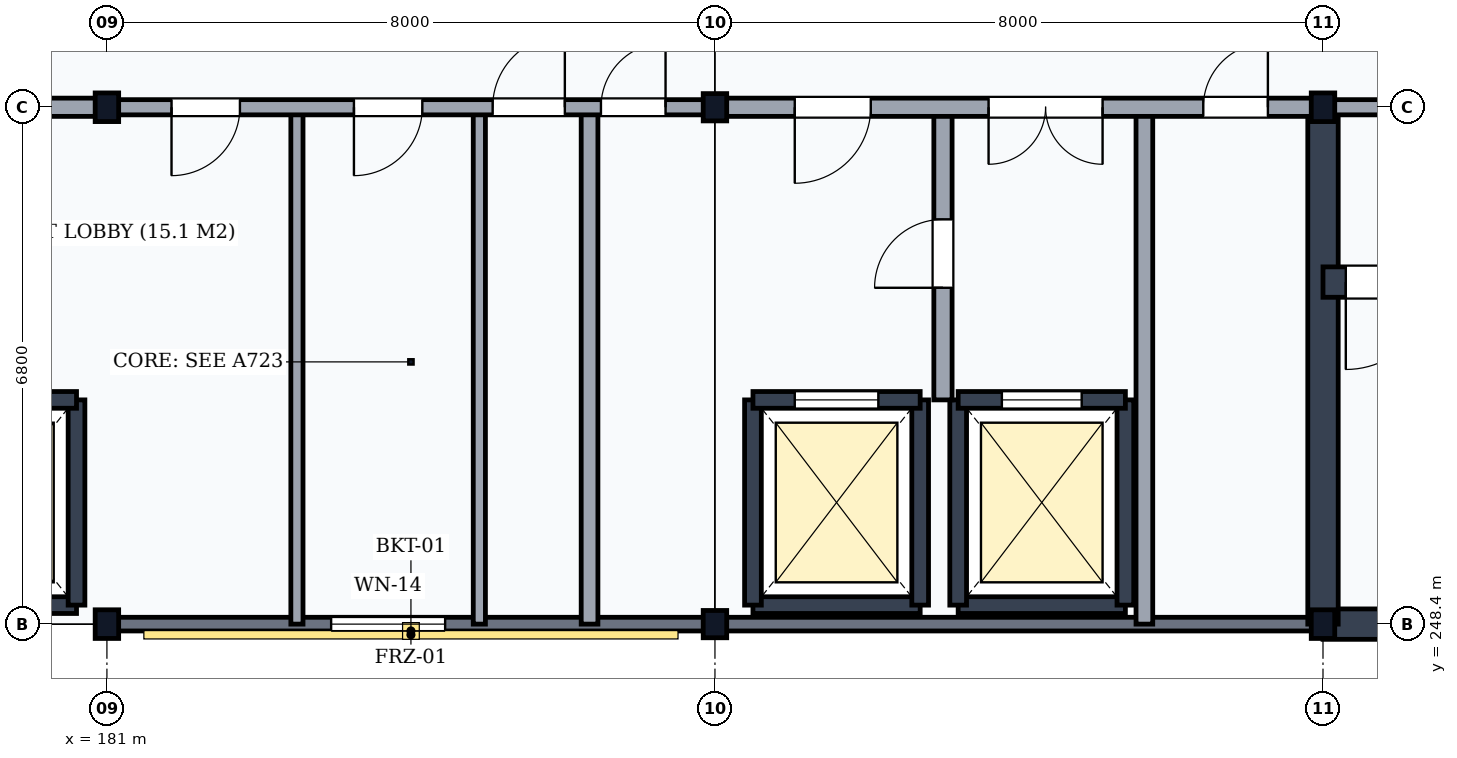
"""IFC4 building model, lengths in metres.
Left out: names, types, materials, properties, quantities, classifications, styles, units other than length and angle.
Written with IfcOpenShell. Run it as: python <this file> out.ifc"""

import sys

from ifc_helpers import new_model, si_unit, direction, frame, frame_2d, origin, origin_2d, place, context, subcontext, project, spatial, rectangle, i_section, extrude, element, fill, save


model = new_model("IFC4")
c1 = context("Model", 3, precision=1e-05, world=origin(), true_north=direction((0.0, 1.0)))
c2 = subcontext(c1, "Body", "Model", "MODEL_VIEW")
j1 = project(units=[si_unit("LENGTHUNIT", "METRE"), si_unit("PLANEANGLEUNIT", "RADIAN")], contexts=[c1])
p1 = place(None, origin())
s1 = spatial("IfcSite", under=j1, at=p1, CompositionType="ELEMENT")
p2 = place(p1, origin())
s2 = spatial("IfcBuilding", under=s1, at=p2, CompositionType="ELEMENT")
p3 = place(p2, frame((0.0, 0.0, 51.6)))
s3 = spatial("IfcBuildingStorey", under=s2, at=p3, CompositionType="ELEMENT", Elevation=51.6)
for number, where, z_axis, x_axis in (
    (1, (181.0, 248.4, 0.0), (0.0, 0.0, 1.0), (1.0, 0.0, 0.0)),
    (2, (181.0, 255.2, 0.0), (0.0, 0.0, 1.0), (1.0, 0.0, 0.0)),
):
    element("IfcColumn", number, at=place(p3, frame(where, z_axis=z_axis, x_axis=x_axis)), inside=s3, PredefinedType="COLUMN", context=c2, shape_type="SweptSolid", body=[
        extrude(i_section(OverallWidth=0.309, OverallDepth=0.377, WebThickness=0.021, FlangeThickness=0.04, FilletRadius=0.027, at=origin_2d()), origin(), (0.0, 0.0, 1.0), 4.5),
    ])
for number, where, z_axis, x_axis in (
    (3, (189.0, 248.4, 0.0), (0.0, 0.0, 1.0), (1.0, 0.0, 0.0)),
    (4, (189.0, 255.2, 0.0), (0.0, 0.0, 1.0), (1.0, 0.0, 0.0)),
):
    element("IfcColumn", number, at=place(p3, frame(where, z_axis=z_axis, x_axis=x_axis)), inside=s3, PredefinedType="COLUMN", context=c2, shape_type="SweptSolid", body=[
        extrude(i_section(OverallWidth=0.309, OverallDepth=0.359, WebThickness=0.021, FlangeThickness=0.04, FilletRadius=0.027, at=origin_2d()), origin(), (0.0, 0.0, 1.0), 4.5),
    ])
for number, where, z_axis, x_axis in (
    (5, (197.0, 248.4, 0.0), (0.0, 0.0, 1.0), (1.0, 0.0, 0.0)),
    (6, (197.0, 255.2, 0.0), (0.0, 0.0, 1.0), (1.0, 0.0, 0.0)),
):
    element("IfcColumn", number, at=place(p3, frame(where, z_axis=z_axis, x_axis=x_axis)), inside=s3, PredefinedType="COLUMN", context=c2, shape_type="SweptSolid", body=[
        extrude(i_section(OverallWidth=0.309, OverallDepth=0.377, WebThickness=0.021, FlangeThickness=0.04, FilletRadius=0.027, at=origin_2d()), origin(), (0.0, 0.0, 1.0), 4.5),
    ])
p4 = place(p3, frame((181.006, 248.4, 0.0), z_axis=(0.0, 0.0, 1.0), x_axis=(1.0, 0.0, 0.0)))
e7 = element("IfcWall", 7, at=p4, inside=s3, PredefinedType="SOLIDWALL", context=c2, shape_type="SweptSolid", body=[
    extrude(rectangle(XDim=7.988, YDim=0.18, at=frame_2d((3.994, 0.0))), origin(), (0.0, 0.0, 1.0), 3.868),
])
p5 = place(p4, frame((2.944, 0.0, 0.95)))
e8 = element("IfcOpeningElement", 8, at=p5, cuts=e7, PredefinedType="OPENING", context=c2, shape_type="SweptSolid", body=[
    extrude(rectangle(XDim=1.5, YDim=1.9, at=frame_2d((0.75, 0.95))), frame((0.0, 0.105, 0.0), z_axis=(0.0, -1.0, 0.0), x_axis=(1.0, 0.0, 0.0)), (0.0, 0.0, 1.0), 0.21),
])
p6 = place(p3, frame((189.006, 248.4, 0.0), z_axis=(0.0, 0.0, 1.0), x_axis=(1.0, 0.0, 0.0)))
e9 = element("IfcWall", 9, at=p6, inside=s3, PredefinedType="SOLIDWALL", context=c2, shape_type="SweptSolid", body=[
    extrude(rectangle(XDim=7.988, YDim=0.18, at=frame_2d((3.994, 0.0))), origin(), (0.0, 0.0, 1.0), 3.868),
])
p7 = place(p3, frame((197.0, 248.4, 0.0), z_axis=(0.0, 0.0, 1.0), x_axis=(1.0, 0.0, 0.0)))
e10 = element("IfcWall", 10, at=p7, inside=s3, PredefinedType="SHEAR", context=c2, shape_type="SweptSolid", body=[
    extrude(rectangle(XDim=8.0, YDim=0.4, at=frame_2d((4.0, 0.0))), origin(), (0.0, 0.0, 1.0), 4.18),
])
p8 = place(p3, frame((197.0, 248.4, 0.0), z_axis=(0.0, 0.0, 1.0), x_axis=(0.0, 1.0, 0.0)))
e11 = element("IfcWall", 11, at=p8, inside=s3, PredefinedType="SHEAR", context=c2, shape_type="SweptSolid", body=[
    extrude(rectangle(XDim=6.8, YDim=0.4, at=frame_2d((3.4, 0.0))), origin(), (0.0, 0.0, 1.0), 4.18),
])
p9 = place(p3, frame((197.0, 252.9, 0.0), z_axis=(0.0, 0.0, 1.0), x_axis=(1.0, 0.0, 0.0)))
e12 = element("IfcWall", 12, at=p9, inside=s3, PredefinedType="SHEAR", context=c2, shape_type="SweptSolid", body=[
    extrude(rectangle(XDim=8.0, YDim=0.4, at=frame_2d((4.0, 0.0))), origin(), (0.0, 0.0, 1.0), 4.18),
])
p10 = place(p9, frame((0.3, 0.0, 0.0)))
e13 = element("IfcOpeningElement", 13, at=p10, cuts=e12, PredefinedType="OPENING", context=c2, shape_type="SweptSolid", body=[
    extrude(rectangle(XDim=1.15, YDim=2.15, at=frame_2d((0.575, 1.075))), frame((0.0, 0.215, 0.0), z_axis=(0.0, -1.0, 0.0), x_axis=(1.0, 0.0, 0.0)), (0.0, 0.0, 1.0), 0.43),
])
p11 = place(p3, frame((197.0, 255.2, 0.0), z_axis=(0.0, 0.0, 1.0), x_axis=(1.0, 0.0, 0.0)))
e14 = element("IfcWall", 14, at=p11, inside=s3, PredefinedType="PARTITIONING", context=c2, shape_type="SweptSolid", body=[
    extrude(rectangle(XDim=8.0, YDim=0.2, at=frame_2d((4.0, 0.0))), origin(), (0.0, 0.0, 1.0), 3.678),
])
p12 = place(p11, frame((3.275, 0.0, 0.0)))
e15 = element("IfcOpeningElement", 15, at=p12, cuts=e14, PredefinedType="OPENING", context=c2, shape_type="SweptSolid", body=[
    extrude(rectangle(XDim=1.45, YDim=2.2, at=frame_2d((0.725, 1.1))), frame((0.0, 0.115, 0.0), z_axis=(0.0, -1.0, 0.0), x_axis=(1.0, 0.0, 0.0)), (0.0, 0.0, 1.0), 0.23),
])
p13 = place(p3, frame((178.4, 248.65, 0.0), z_axis=(0.0, 0.0, 1.0), x_axis=(1.0, 0.0, 0.0)))
e16 = element("IfcWall", 16, at=p13, inside=s3, PredefinedType="SHEAR", context=c2, shape_type="SweptSolid", body=[
    extrude(rectangle(XDim=2.2, YDim=0.22, at=frame_2d((1.1, 0.0))), origin(), (0.0, 0.0, 1.0), 4.18),
])
p14 = place(p3, frame((180.6, 248.65, 0.0), z_axis=(0.0, 0.0, 1.0), x_axis=(0.0, 1.0, 0.0)))
e17 = element("IfcWall", 17, at=p14, inside=s3, PredefinedType="SHEAR", context=c2, shape_type="SweptSolid", body=[
    extrude(rectangle(XDim=2.7, YDim=0.22, at=frame_2d((1.35, 0.0))), origin(), (0.0, 0.0, 1.0), 4.18),
])
p15 = place(p3, frame((178.4, 251.35, 0.0), z_axis=(0.0, 0.0, 1.0), x_axis=(1.0, 0.0, 0.0)))
e18 = element("IfcWall", 18, at=p15, inside=s3, PredefinedType="SHEAR", context=c2, shape_type="SweptSolid", body=[
    extrude(rectangle(XDim=2.2, YDim=0.22, at=frame_2d((1.1, 0.0))), origin(), (0.0, 0.0, 1.0), 4.18),
])
p16 = place(p15, frame((0.575, 0.0, 0.0)))
e19 = element("IfcOpeningElement", 19, at=p16, cuts=e18, PredefinedType="OPENING", context=c2, shape_type="SweptSolid", body=[
    extrude(rectangle(XDim=1.05, YDim=2.15, at=frame_2d((0.525, 1.075))), frame((0.0, 0.125, 0.0), z_axis=(0.0, -1.0, 0.0), x_axis=(1.0, 0.0, 0.0)), (0.0, 0.0, 1.0), 0.25),
])
p17 = place(p3, frame((189.5, 248.65, 0.0), z_axis=(0.0, 0.0, 1.0), x_axis=(1.0, 0.0, 0.0)))
e20 = element("IfcWall", 20, at=p17, inside=s3, PredefinedType="SHEAR", context=c2, shape_type="SweptSolid", body=[
    extrude(rectangle(XDim=2.2, YDim=0.22, at=frame_2d((1.1, 0.0))), origin(), (0.0, 0.0, 1.0), 4.18),
])
for number, where, z_axis, x_axis in (
    (21, (189.5, 248.65, 0.0), (0.0, 0.0, 1.0), (0.0, 1.0, 0.0)),
    (22, (191.7, 248.65, 0.0), (0.0, 0.0, 1.0), (0.0, 1.0, 0.0)),
):
    element("IfcWall", number, at=place(p3, frame(where, z_axis=z_axis, x_axis=x_axis)), inside=s3, PredefinedType="SHEAR", context=c2, shape_type="SweptSolid", body=[
        extrude(rectangle(XDim=2.7, YDim=0.22, at=frame_2d((1.35, 0.0))), origin(), (0.0, 0.0, 1.0), 4.18),
    ])
p18 = place(p3, frame((189.5, 251.35, 0.0), z_axis=(0.0, 0.0, 1.0), x_axis=(1.0, 0.0, 0.0)))
e23 = element("IfcWall", 23, at=p18, inside=s3, PredefinedType="SHEAR", context=c2, shape_type="SweptSolid", body=[
    extrude(rectangle(XDim=2.2, YDim=0.22, at=frame_2d((1.1, 0.0))), origin(), (0.0, 0.0, 1.0), 4.18),
])
p19 = place(p18, frame((0.55, 0.0, 0.0)))
e24 = element("IfcOpeningElement", 24, at=p19, cuts=e23, PredefinedType="OPENING", context=c2, shape_type="SweptSolid", body=[
    extrude(rectangle(XDim=1.1, YDim=2.15, at=frame_2d((0.55, 1.075))), frame((0.0, 0.125, 0.0), z_axis=(0.0, -1.0, 0.0), x_axis=(1.0, 0.0, 0.0)), (0.0, 0.0, 1.0), 0.25),
])
p20 = place(p3, frame((192.2, 248.65, 0.0), z_axis=(0.0, 0.0, 1.0), x_axis=(1.0, 0.0, 0.0)))
e25 = element("IfcWall", 25, at=p20, inside=s3, PredefinedType="SHEAR", context=c2, shape_type="SweptSolid", body=[
    extrude(rectangle(XDim=2.2, YDim=0.22, at=frame_2d((1.1, 0.0))), origin(), (0.0, 0.0, 1.0), 4.18),
])
for number, where, z_axis, x_axis in (
    (26, (192.2, 248.65, 0.0), (0.0, 0.0, 1.0), (0.0, 1.0, 0.0)),
    (27, (194.4, 248.65, 0.0), (0.0, 0.0, 1.0), (0.0, 1.0, 0.0)),
):
    element("IfcWall", number, at=place(p3, frame(where, z_axis=z_axis, x_axis=x_axis)), inside=s3, PredefinedType="SHEAR", context=c2, shape_type="SweptSolid", body=[
        extrude(rectangle(XDim=2.7, YDim=0.22, at=frame_2d((1.35, 0.0))), origin(), (0.0, 0.0, 1.0), 4.18),
    ])
p21 = place(p3, frame((192.2, 251.35, 0.0), z_axis=(0.0, 0.0, 1.0), x_axis=(1.0, 0.0, 0.0)))
e28 = element("IfcWall", 28, at=p21, inside=s3, PredefinedType="SHEAR", context=c2, shape_type="SweptSolid", body=[
    extrude(rectangle(XDim=2.2, YDim=0.22, at=frame_2d((1.1, 0.0))), origin(), (0.0, 0.0, 1.0), 4.18),
])
p22 = place(p21, frame((0.575, 0.0, 0.0)))
e29 = element("IfcOpeningElement", 29, at=p22, cuts=e28, PredefinedType="OPENING", context=c2, shape_type="SweptSolid", body=[
    extrude(rectangle(XDim=1.05, YDim=2.15, at=frame_2d((0.525, 1.075))), frame((0.0, 0.125, 0.0), z_axis=(0.0, -1.0, 0.0), x_axis=(1.0, 0.0, 0.0)), (0.0, 0.0, 1.0), 0.25),
])
p23 = place(p3, frame((192.0, 251.35, 0.0), z_axis=(0.0, 0.0, 1.0), x_axis=(0.0, 1.0, 0.0)))
e30 = element("IfcWall", 30, at=p23, inside=s3, PredefinedType="PARTITIONING", context=c2, shape_type="SweptSolid", body=[
    extrude(rectangle(XDim=3.85, YDim=0.24, at=frame_2d((1.925, 0.0))), origin(), (0.0, 0.0, 1.0), 4.18),
])
p24 = place(p23, frame((1.475, 0.0, 0.0)))
e31 = element("IfcOpeningElement", 31, at=p24, cuts=e30, PredefinedType="OPENING", context=c2, shape_type="SweptSolid", body=[
    extrude(rectangle(XDim=0.9, YDim=2.1, at=frame_2d((0.45, 1.05))), frame((0.0, 0.135, 0.0), z_axis=(0.0, -1.0, 0.0), x_axis=(1.0, 0.0, 0.0)), (0.0, 0.0, 1.0), 0.27),
])
p25 = place(p3, frame((194.65, 248.4, 0.0), z_axis=(0.0, 0.0, 1.0), x_axis=(0.0, 1.0, 0.0)))
e32 = element("IfcWall", 32, at=p25, inside=s3, PredefinedType="PARTITIONING", context=c2, shape_type="SweptSolid", body=[
    extrude(rectangle(XDim=6.8, YDim=0.22, at=frame_2d((3.4, 0.0))), origin(), (0.0, 0.0, 1.0), 4.18),
])
for number, where, z_axis, x_axis in (
    (33, (183.5, 248.4, 0.0), (0.0, 0.0, 1.0), (0.0, 1.0, 0.0)),
    (34, (185.9, 248.4, 0.0), (0.0, 0.0, 1.0), (0.0, 1.0, 0.0)),
):
    element("IfcWall", number, at=place(p3, frame(where, z_axis=z_axis, x_axis=x_axis)), inside=s3, PredefinedType="PARTITIONING", context=c2, shape_type="SweptSolid", body=[
        extrude(rectangle(XDim=6.8, YDim=0.16, at=frame_2d((3.4, 0.0))), origin(), (0.0, 0.0, 1.0), 4.18),
    ])
p26 = place(p3, frame((187.35, 248.4, 0.0), z_axis=(0.0, 0.0, 1.0), x_axis=(0.0, 1.0, 0.0)))
e35 = element("IfcWall", 35, at=p26, inside=s3, PredefinedType="PARTITIONING", context=c2, shape_type="SweptSolid", body=[
    extrude(rectangle(XDim=6.8, YDim=0.22, at=frame_2d((3.4, 0.0))), origin(), (0.0, 0.0, 1.0), 4.18),
])
p27 = place(p3, frame((173.0, 255.2, 0.0), z_axis=(0.0, 0.0, 1.0), x_axis=(1.0, 0.0, 0.0)))
e36 = element("IfcWall", 36, at=p27, inside=s3, PredefinedType="PARTITIONING", context=c2, shape_type="SweptSolid", body=[
    extrude(rectangle(XDim=8.0, YDim=0.24, at=frame_2d((4.0, 0.0))), origin(), (0.0, 0.0, 1.0), 3.678),
])
p28 = place(p27, frame((1.05, 0.0, 0.0)))
e37 = element("IfcOpeningElement", 37, at=p28, cuts=e36, PredefinedType="OPENING", context=c2, shape_type="SweptSolid", body=[
    extrude(rectangle(XDim=1.0, YDim=2.1, at=frame_2d((0.5, 1.05))), frame((0.0, 0.135, 0.0), z_axis=(0.0, -1.0, 0.0), x_axis=(1.0, 0.0, 0.0)), (0.0, 0.0, 1.0), 0.27),
])
p29 = place(p27, frame((4.6, 0.0, 0.0)))
e38 = element("IfcOpeningElement", 38, at=p29, cuts=e36, PredefinedType="OPENING", context=c2, shape_type="SweptSolid", body=[
    extrude(rectangle(XDim=1.6, YDim=2.25, at=frame_2d((0.8, 1.125))), frame((0.0, 0.135, 0.0), z_axis=(0.0, -1.0, 0.0), x_axis=(1.0, 0.0, 0.0)), (0.0, 0.0, 1.0), 0.27),
])
p30 = place(p3, frame((181.0, 255.2, 0.0), z_axis=(0.0, 0.0, 1.0), x_axis=(1.0, 0.0, 0.0)))
e39 = element("IfcWall", 39, at=p30, inside=s3, PredefinedType="PARTITIONING", context=c2, shape_type="SweptSolid", body=[
    extrude(rectangle(XDim=8.0, YDim=0.2, at=frame_2d((4.0, 0.0))), origin(), (0.0, 0.0, 1.0), 3.678),
])
p31 = place(p30, frame((0.85, 0.0, 0.0)))
e40 = element("IfcOpeningElement", 40, at=p31, cuts=e39, PredefinedType="OPENING", context=c2, shape_type="SweptSolid", body=[
    extrude(rectangle(XDim=0.9, YDim=2.1, at=frame_2d((0.45, 1.05))), frame((0.0, 0.115, 0.0), z_axis=(0.0, -1.0, 0.0), x_axis=(1.0, 0.0, 0.0)), (0.0, 0.0, 1.0), 0.23),
])
p32 = place(p30, frame((3.25, 0.0, 0.0)))
e41 = element("IfcOpeningElement", 41, at=p32, cuts=e39, PredefinedType="OPENING", context=c2, shape_type="SweptSolid", body=[
    extrude(rectangle(XDim=0.9, YDim=2.1, at=frame_2d((0.45, 1.05))), frame((0.0, 0.115, 0.0), z_axis=(0.0, -1.0, 0.0), x_axis=(1.0, 0.0, 0.0)), (0.0, 0.0, 1.0), 0.23),
])
p33 = place(p30, frame((5.075, 0.0, 0.0)))
e42 = element("IfcOpeningElement", 42, at=p33, cuts=e39, PredefinedType="OPENING", context=c2, shape_type="SweptSolid", body=[
    extrude(rectangle(XDim=0.95, YDim=2.1, at=frame_2d((0.475, 1.05))), frame((0.0, 0.115, 0.0), z_axis=(0.0, -1.0, 0.0), x_axis=(1.0, 0.0, 0.0)), (0.0, 0.0, 1.0), 0.23),
])
p34 = place(p30, frame((6.5, 0.0, 0.0)))
e43 = element("IfcOpeningElement", 43, at=p34, cuts=e39, PredefinedType="OPENING", context=c2, shape_type="SweptSolid", body=[
    extrude(rectangle(XDim=0.85, YDim=2.1, at=frame_2d((0.425, 1.05))), frame((0.0, 0.115, 0.0), z_axis=(0.0, -1.0, 0.0), x_axis=(1.0, 0.0, 0.0)), (0.0, 0.0, 1.0), 0.23),
])
p35 = place(p3, frame((189.0, 255.2, 0.0), z_axis=(0.0, 0.0, 1.0), x_axis=(1.0, 0.0, 0.0)))
e44 = element("IfcWall", 44, at=p35, inside=s3, PredefinedType="PARTITIONING", context=c2, shape_type="SweptSolid", body=[
    extrude(rectangle(XDim=8.0, YDim=0.24, at=frame_2d((4.0, 0.0))), origin(), (0.0, 0.0, 1.0), 3.678),
])
p36 = place(p35, frame((1.05, 0.0, 0.0)))
e45 = element("IfcOpeningElement", 45, at=p36, cuts=e44, PredefinedType="OPENING", context=c2, shape_type="SweptSolid", body=[
    extrude(rectangle(XDim=1.0, YDim=2.1, at=frame_2d((0.5, 1.05))), frame((0.0, 0.135, 0.0), z_axis=(0.0, -1.0, 0.0), x_axis=(1.0, 0.0, 0.0)), (0.0, 0.0, 1.0), 0.27),
])
p37 = place(p35, frame((3.6, 0.0, 0.0)))
e46 = element("IfcOpeningElement", 46, at=p37, cuts=e44, PredefinedType="OPENING", context=c2, shape_type="SweptSolid", body=[
    extrude(rectangle(XDim=1.5, YDim=2.25, at=frame_2d((0.75, 1.125))), frame((0.0, 0.135, 0.0), z_axis=(0.0, -1.0, 0.0), x_axis=(1.0, 0.0, 0.0)), (0.0, 0.0, 1.0), 0.27),
])
p38 = place(p35, frame((6.425, 0.0, 0.0)))
e47 = element("IfcOpeningElement", 47, at=p38, cuts=e44, PredefinedType="OPENING", context=c2, shape_type="SweptSolid", body=[
    extrude(rectangle(XDim=0.85, YDim=2.1, at=frame_2d((0.425, 1.05))), frame((0.0, 0.135, 0.0), z_axis=(0.0, -1.0, 0.0), x_axis=(1.0, 0.0, 0.0)), (0.0, 0.0, 1.0), 0.27),
])
p39 = place(p5, origin())
e48 = element("IfcWindow", 48, at=p39, inside=s3, PartitioningType="SINGLE_PANEL", PredefinedType="WINDOW", context=c2, shape_type="SweptSolid", body=[
    extrude(rectangle(XDim=1.5, YDim=1.9, at=frame_2d((0.75, 0.95))), frame((0.0, 0.03, 0.0), z_axis=(0.0, -1.0, 0.0), x_axis=(1.0, 0.0, 0.0)), (0.0, 0.0, 1.0), 0.06),
])
fill(e8, e48)
p40 = place(p10, frame((1.15, 0.0, 0.0), z_axis=(0.0, 0.0, 1.0), x_axis=(-1.0, 0.0, 0.0)))
e49 = element("IfcDoor", 49, at=p40, inside=s3, OperationType="SINGLE_SWING_RIGHT", PredefinedType="DOOR", context=c2, shape_type="SweptSolid", body=[
    extrude(rectangle(XDim=1.15, YDim=2.15, at=frame_2d((0.575, 1.075))), frame((0.0, 0.025, 0.0), z_axis=(0.0, -1.0, 0.0), x_axis=(1.0, 0.0, 0.0)), (0.0, 0.0, 1.0), 0.05),
])
fill(e13, e49)
p41 = place(p19, origin())
e50 = element("IfcDoor", 50, at=p41, inside=s3, OperationType="DOUBLE_DOOR_SLIDING", PredefinedType="USERDEFINED", context=c2, shape_type="SweptSolid", body=[
    extrude(rectangle(XDim=1.1, YDim=2.15, at=frame_2d((0.55, 1.075))), frame((0.0, 0.025, 0.0), z_axis=(0.0, -1.0, 0.0), x_axis=(1.0, 0.0, 0.0)), (0.0, 0.0, 1.0), 0.05),
])
fill(e24, e50)
p42 = place(p22, origin())
e51 = element("IfcDoor", 51, at=p42, inside=s3, OperationType="DOUBLE_DOOR_SLIDING", PredefinedType="USERDEFINED", context=c2, shape_type="SweptSolid", body=[
    extrude(rectangle(XDim=1.05, YDim=2.15, at=frame_2d((0.525, 1.075))), frame((0.0, 0.025, 0.0), z_axis=(0.0, -1.0, 0.0), x_axis=(1.0, 0.0, 0.0)), (0.0, 0.0, 1.0), 0.05),
])
fill(e29, e51)
p43 = place(p24, origin())
e52 = element("IfcDoor", 52, at=p43, inside=s3, OperationType="SINGLE_SWING_LEFT", PredefinedType="DOOR", context=c2, shape_type="SweptSolid", body=[
    extrude(rectangle(XDim=0.9, YDim=2.1, at=frame_2d((0.45, 1.05))), frame((0.0, 0.025, 0.0), z_axis=(0.0, -1.0, 0.0), x_axis=(1.0, 0.0, 0.0)), (0.0, 0.0, 1.0), 0.05),
])
fill(e31, e52)
p44 = place(p31, frame((0.9, 0.0, 0.0), z_axis=(0.0, 0.0, 1.0), x_axis=(-1.0, 0.0, 0.0)))
e53 = element("IfcDoor", 53, at=p44, inside=s3, OperationType="SINGLE_SWING_RIGHT", PredefinedType="DOOR", context=c2, shape_type="SweptSolid", body=[
    extrude(rectangle(XDim=0.9, YDim=2.1, at=frame_2d((0.45, 1.05))), frame((0.0, 0.025, 0.0), z_axis=(0.0, -1.0, 0.0), x_axis=(1.0, 0.0, 0.0)), (0.0, 0.0, 1.0), 0.05),
])
fill(e40, e53)
p45 = place(p32, frame((0.9, 0.0, 0.0), z_axis=(0.0, 0.0, 1.0), x_axis=(-1.0, 0.0, 0.0)))
e54 = element("IfcDoor", 54, at=p45, inside=s3, OperationType="SINGLE_SWING_RIGHT", PredefinedType="DOOR", context=c2, shape_type="SweptSolid", body=[
    extrude(rectangle(XDim=0.9, YDim=2.1, at=frame_2d((0.45, 1.05))), frame((0.0, 0.025, 0.0), z_axis=(0.0, -1.0, 0.0), x_axis=(1.0, 0.0, 0.0)), (0.0, 0.0, 1.0), 0.05),
])
fill(e41, e54)
p46 = place(p33, frame((0.95, 0.0, 0.0), z_axis=(0.0, 0.0, 1.0), x_axis=(-1.0, 0.0, 0.0)))
e55 = element("IfcDoor", 55, at=p46, inside=s3, OperationType="SINGLE_SWING_LEFT", PredefinedType="DOOR", context=c2, shape_type="SweptSolid", body=[
    extrude(rectangle(XDim=0.95, YDim=2.1, at=frame_2d((0.475, 1.05))), frame((0.0, 0.025, 0.0), z_axis=(0.0, -1.0, 0.0), x_axis=(1.0, 0.0, 0.0)), (0.0, 0.0, 1.0), 0.05),
])
fill(e42, e55)
p47 = place(p34, frame((0.85, 0.0, 0.0), z_axis=(0.0, 0.0, 1.0), x_axis=(-1.0, 0.0, 0.0)))
e56 = element("IfcDoor", 56, at=p47, inside=s3, OperationType="SINGLE_SWING_LEFT", PredefinedType="DOOR", context=c2, shape_type="SweptSolid", body=[
    extrude(rectangle(XDim=0.85, YDim=2.1, at=frame_2d((0.425, 1.05))), frame((0.0, 0.025, 0.0), z_axis=(0.0, -1.0, 0.0), x_axis=(1.0, 0.0, 0.0)), (0.0, 0.0, 1.0), 0.05),
])
fill(e43, e56)
p48 = place(p36, frame((1.0, 0.0, 0.0), z_axis=(0.0, 0.0, 1.0), x_axis=(-1.0, 0.0, 0.0)))
e57 = element("IfcDoor", 57, at=p48, inside=s3, OperationType="SINGLE_SWING_RIGHT", PredefinedType="DOOR", context=c2, shape_type="SweptSolid", body=[
    extrude(rectangle(XDim=1.0, YDim=2.1, at=frame_2d((0.5, 1.05))), frame((0.0, 0.025, 0.0), z_axis=(0.0, -1.0, 0.0), x_axis=(1.0, 0.0, 0.0)), (0.0, 0.0, 1.0), 0.05),
])
fill(e45, e57)
p49 = place(p37, frame((1.5, 0.0, 0.0), z_axis=(0.0, 0.0, 1.0), x_axis=(-1.0, 0.0, 0.0)))
e58 = element("IfcDoor", 58, at=p49, inside=s3, OperationType="DOUBLE_DOOR_SINGLE_SWING", PredefinedType="DOOR", context=c2, shape_type="SweptSolid", body=[
    extrude(rectangle(XDim=1.5, YDim=2.25, at=frame_2d((0.75, 1.125))), frame((0.0, 0.025, 0.0), z_axis=(0.0, -1.0, 0.0), x_axis=(1.0, 0.0, 0.0)), (0.0, 0.0, 1.0), 0.05),
])
fill(e46, e58)
p50 = place(p38, frame((0.85, 0.0, 0.0), z_axis=(0.0, 0.0, 1.0), x_axis=(-1.0, 0.0, 0.0)))
e59 = element("IfcDoor", 59, at=p50, inside=s3, OperationType="SINGLE_SWING_LEFT", PredefinedType="DOOR", context=c2, shape_type="SweptSolid", body=[
    extrude(rectangle(XDim=0.85, YDim=2.1, at=frame_2d((0.425, 1.05))), frame((0.0, 0.025, 0.0), z_axis=(0.0, -1.0, 0.0), x_axis=(1.0, 0.0, 0.0)), (0.0, 0.0, 1.0), 0.05),
])
fill(e47, e59)
save(model, sys.argv[1])
